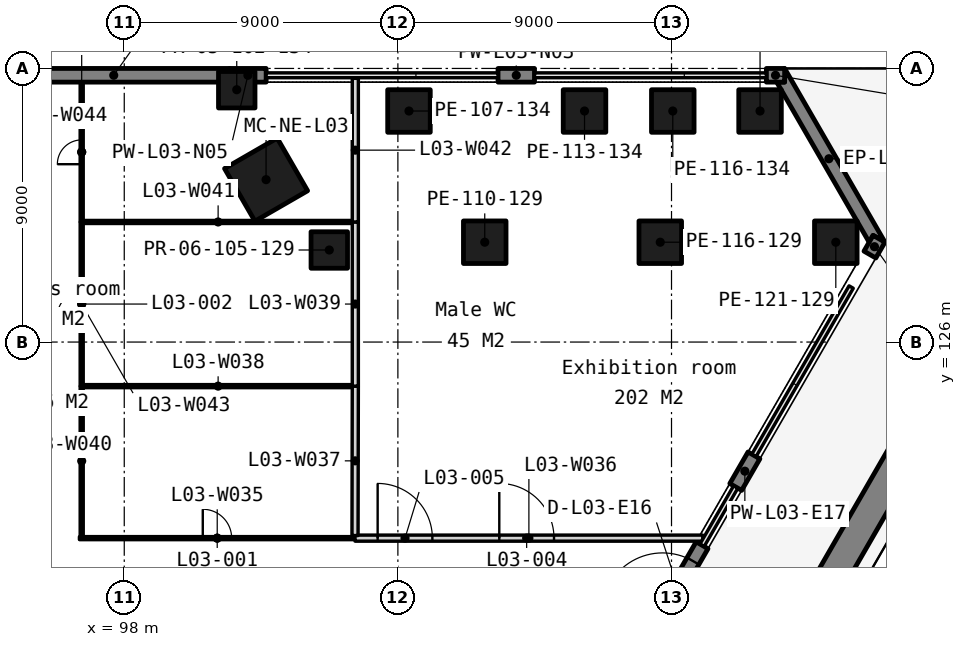
"""IFC4 building model, lengths in metres.
Left out: names, types, materials, properties, quantities, classifications, styles, units other than length and angle.
Written with IfcOpenShell. Run it as: python <this file> out.ifc"""

import sys

from ifc_helpers import new_model, si_unit, direction, frame, frame_2d, origin, origin_2d, place, context, subcontext, project, spatial, polyline, rectangle, outline, extrude, element, fill, save


model = new_model("IFC4")
c1 = context("Model", 3, precision=1e-05, world=origin(), true_north=direction((0.0, 1.0)))
c2 = subcontext(c1, "Body", "Model", "MODEL_VIEW")
j1 = project(units=[si_unit("LENGTHUNIT", "METRE"), si_unit("PLANEANGLEUNIT", "RADIAN")], contexts=[c1])
p1 = place(None, origin())
s1 = spatial("IfcSite", under=j1, at=p1, CompositionType="ELEMENT")
p2 = place(p1, origin())
s2 = spatial("IfcBuilding", under=s1, at=p2, CompositionType="ELEMENT")
p3 = place(p2, frame((0.0, 0.0, 19.5)))
s3 = spatial("IfcBuildingStorey", under=s2, at=p3, CompositionType="ELEMENT", Elevation=19.5)
for number, where, z_axis, x_axis in (
    (1, (107.365, 133.6, 0.0), (0.0, 0.0, 1.0), (1.0, 0.0, 0.0)),
    (2, (109.857, 129.284, 0.0), (0.0, 0.0, 1.0), (1.0, 0.0, 0.0)),
    (3, (113.139, 133.6, 0.0), (0.0, 0.0, 1.0), (1.0, 0.0, 0.0)),
    (4, (115.63, 129.284, 0.0), (0.0, 0.0, 1.0), (1.0, 0.0, 0.0)),
    (5, (116.042, 133.6, 0.0), (0.0, 0.0, 1.0), (1.0, 0.0, 0.0)),
    (6, (118.912, 133.6, 0.0), (0.0, 0.0, 1.0), (1.0, 0.0, 0.0)),
    (7, (121.404, 129.284, 0.0), (0.0, 0.0, 1.0), (1.0, 0.0, 0.0)),
):
    element("IfcColumn", number, at=place(p3, frame(where, z_axis=z_axis, x_axis=x_axis)), inside=s3, PredefinedType="COLUMN", context=c2, shape_type="SweptSolid", body=[
        extrude(rectangle(XDim=1.4, YDim=1.4, at=origin_2d()), origin(), (0.0, 0.0, 1.0), 5.5),
    ])
for number, where, z_axis, x_axis in (
    (8, (101.7, 134.3, 0.0), (0.0, 0.0, 1.0), (1.0, 0.0, 0.0)),
    (9, (104.744, 129.028, 0.0), (0.0, 0.0, 1.0), (1.0, 0.0, 0.0)),
):
    element("IfcColumn", number, at=place(p3, frame(where, z_axis=z_axis, x_axis=x_axis)), inside=s3, PredefinedType="COLUMN", context=c2, shape_type="SweptSolid", body=[
        extrude(rectangle(XDim=1.2, YDim=1.2, at=origin_2d()), origin(), (0.0, 0.0, 1.0), 5.5),
    ])
p4 = place(p3, frame((102.664, 131.342, 0.0), z_axis=(0.0, 0.0, 1.0), x_axis=(-0.5, 0.866025403784, 0.0)))
e10 = element("IfcColumn", 10, at=p4, inside=s3, PredefinedType="COLUMN", context=c2, shape_type="SweptSolid", body=[
    extrude(rectangle(XDim=2.0, YDim=2.0, at=origin_2d()), origin(), (0.0, 0.0, 1.0), 5.5),
])
p5 = place(p3, frame((0.0, 0.0, -0.25)))
e11 = element("IfcWall", 11, at=p5, inside=s3, PredefinedType="SOLIDWALL", context=c2, shape_type="SweptSolid", body=[
    extrude(outline(polyline([(123.021, 129.284), (122.631, 129.509), (122.501, 129.284), (119.461, 134.55), (119.72, 134.55), (119.72, 135.0), (123.021, 129.284)])), origin(), (0.0, 0.0, 1.0), 4.812),
])
p6 = place(p3, frame((119.72, 134.775, -0.25), z_axis=(0.0, 0.0, 1.0), x_axis=(-1.0, 0.0, 0.0)))
e12 = element("IfcWall", 12, at=p6, inside=s3, PredefinedType="SOLIDWALL", context=c2, shape_type="SweptSolid", body=[
    extrude(rectangle(XDim=0.6, YDim=0.45, at=frame_2d((0.3, 0.0))), origin(), (0.0, 0.0, 1.0), 4.812),
])
for number, where, z_axis, x_axis in (
    (13, (111.494, 134.775, -0.25), (0.0, 0.0, 1.0), (-1.0, 0.0, 0.0)),
    (14, (102.667, 134.775, -0.25), (0.0, 0.0, 1.0), (-1.0, 0.0, 0.0)),
):
    element("IfcWall", number, at=place(p3, frame(where, z_axis=z_axis, x_axis=x_axis)), inside=s3, PredefinedType="SOLIDWALL", context=c2, shape_type="SweptSolid", body=[
        extrude(rectangle(XDim=1.2, YDim=0.45, at=frame_2d((0.6, 0.0))), origin(), (0.0, 0.0, 1.0), 4.812),
    ])
p7 = place(p3, frame((101.467, 134.775, -0.25), z_axis=(0.0, 0.0, 1.0), x_axis=(-1.0, 0.0, 0.0)))
e15 = element("IfcWall", 15, at=p7, inside=s3, PredefinedType="SOLIDWALL", context=c2, shape_type="SweptSolid", body=[
    extrude(rectangle(XDim=7.627, YDim=0.45, at=frame_2d((3.813, 0.0))), origin(), (0.0, 0.0, 1.0), 4.812),
])
p8 = place(p3, frame((115.406, 116.545, -0.25), z_axis=(0.0, 0.0, 1.0), x_axis=(0.499995408039, 0.866028054938, 0.0)))
e16 = element("IfcWall", 16, at=p8, inside=s3, PredefinedType="SOLIDWALL", context=c2, shape_type="SweptSolid", body=[
    extrude(rectangle(XDim=3.2, YDim=0.45, at=frame_2d((1.6, 0.0))), origin(), (0.0, 0.0, 1.0), 4.812),
])
p9 = place(p8, frame((0.6, 0.0, 0.25)))
e17 = element("IfcOpeningElement", 17, at=p9, cuts=e16, PredefinedType="OPENING", context=c2, shape_type="SweptSolid", body=[
    extrude(rectangle(XDim=2.0, YDim=2.4, at=frame_2d((1.0, 1.2))), frame((0.0, 0.235, 0.0), z_axis=(0.0, -1.0, 0.0), x_axis=(1.0, 0.0, 0.0)), (0.0, 0.0, 1.0), 0.47),
])
p10 = place(p3, frame((118.112, 121.233, -0.25), z_axis=(0.0, 0.0, 1.0), x_axis=(0.499880961361, 0.866094119867, 0.0)))
e18 = element("IfcWall", 18, at=p10, inside=s3, PredefinedType="SOLIDWALL", context=c2, shape_type="SweptSolid", body=[
    extrude(rectangle(XDim=1.2, YDim=0.45, at=frame_2d((0.6, 0.0))), origin(), (0.0, 0.0, 1.0), 4.812),
])
p11 = place(p3, frame((122.526, 128.877, -0.25), z_axis=(0.0, 0.0, 1.0), x_axis=(0.50012165622, 0.865955154139, 0.0)))
e19 = element("IfcWall", 19, at=p11, inside=s3, PredefinedType="SOLIDWALL", context=c2, shape_type="SweptSolid", body=[
    extrude(rectangle(XDim=0.6, YDim=0.45, at=frame_2d((0.3, 0.0))), origin(), (0.0, 0.0, 1.0), 4.812),
])
p12 = place(p3, frame((127.528, 129.091, 0.0), z_axis=(0.0, 0.0, 1.0), x_axis=(-0.500001590908, -0.866024485271, 0.0)))
e20 = element("IfcWall", 20, at=p12, inside=s3, PredefinedType="STANDARD", context=c2, shape_type="SweptSolid", body=[
    extrude(rectangle(XDim=89.388, YDim=1.0, at=frame_2d((44.694, 0.0))), origin(), (0.0, 0.0, 1.0), 0.6),
])
p13 = place(p3, frame((96.525, 119.55, 0.0), z_axis=(0.0, 0.0, 1.0), x_axis=(1.0, 0.0, 0.0)))
e21 = element("IfcWall", 21, at=p13, inside=s3, PredefinedType="PARTITIONING", context=c2, shape_type="SweptSolid", body=[
    extrude(rectangle(XDim=9.065, YDim=0.1, at=frame_2d((4.532, 0.0))), origin(), (0.0, 0.0, 1.0), 5.25),
])
p14 = place(p13, frame((4.057, 0.0, 0.0)))
e22 = element("IfcOpeningElement", 22, at=p14, cuts=e21, PredefinedType="OPENING", context=c2, shape_type="SweptSolid", body=[
    extrude(rectangle(XDim=0.95, YDim=2.1, at=frame_2d((0.475, 1.05))), frame((0.0, 0.06, 0.0), z_axis=(0.0, -1.0, 0.0), x_axis=(1.0, 0.0, 0.0)), (0.0, 0.0, 1.0), 0.12),
])
p15 = place(p3, frame((105.59, 119.55, 0.0), z_axis=(0.0, 0.0, 1.0), x_axis=(1.0, 0.0, 0.0)))
e23 = element("IfcWall", 23, at=p15, inside=s3, PredefinedType="PARTITIONING", context=c2, shape_type="SweptSolid", body=[
    extrude(rectangle(XDim=11.438, YDim=0.2, at=frame_2d((5.719, 0.0))), origin(), (0.0, 0.0, 1.0), 5.25),
])
p16 = place(p15, frame((4.745, 0.0, 0.0)))
e24 = element("IfcOpeningElement", 24, at=p16, cuts=e23, PredefinedType="OPENING", context=c2, shape_type="SweptSolid", body=[
    extrude(rectangle(XDim=1.8, YDim=2.1, at=frame_2d((0.9, 1.05))), frame((0.0, 0.11, 0.0), z_axis=(0.0, -1.0, 0.0), x_axis=(1.0, 0.0, 0.0)), (0.0, 0.0, 1.0), 0.22),
])
p17 = place(p15, frame((0.745, 0.0, 0.0)))
e25 = element("IfcOpeningElement", 25, at=p17, cuts=e23, PredefinedType="OPENING", context=c2, shape_type="SweptSolid", body=[
    extrude(rectangle(XDim=1.8, YDim=2.1, at=frame_2d((0.9, 1.05))), frame((0.0, 0.11, 0.0), z_axis=(0.0, -1.0, 0.0), x_axis=(1.0, 0.0, 0.0)), (0.0, 0.0, 1.0), 0.22),
])
p18 = place(p3, frame((105.59, 119.635, 0.0), z_axis=(0.0, 0.0, 1.0), x_axis=(0.002036554489, 0.999997926221, 0.0)))
e26 = element("IfcWall", 26, at=p18, inside=s3, PredefinedType="PARTITIONING", context=c2, shape_type="SweptSolid", body=[
    extrude(rectangle(XDim=4.915, YDim=0.2, at=frame_2d((2.458, 0.0))), origin(), (0.0, 0.0, 1.0), 5.25),
])
p19 = place(p3, frame((96.675, 124.55, 0.0), z_axis=(0.0, 0.0, 1.0), x_axis=(1.0, 0.0, 0.0)))
e27 = element("IfcWall", 27, at=p19, inside=s3, PredefinedType="PARTITIONING", context=c2, shape_type="SweptSolid", body=[
    extrude(rectangle(XDim=8.825, YDim=0.1, at=frame_2d((4.413, 0.0))), origin(), (0.0, 0.0, 1.0), 5.25),
])
p20 = place(p3, frame((105.6, 124.55, 0.0), z_axis=(0.0, 0.0, 1.0), x_axis=(0.0, 1.0, 0.0)))
e28 = element("IfcWall", 28, at=p20, inside=s3, PredefinedType="PARTITIONING", context=c2, shape_type="SweptSolid", body=[
    extrude(rectangle(XDim=5.4, YDim=0.2, at=frame_2d((2.7, 0.0))), origin(), (0.0, 0.0, 1.0), 5.25),
])
p21 = place(p3, frame((96.601, 119.625, 0.0), z_axis=(0.0, 0.0, 1.0), x_axis=(-9.9142418e-05, 0.999999995085, 0.0)))
e29 = element("IfcWall", 29, at=p21, inside=s3, PredefinedType="PARTITIONING", context=c2, shape_type="SweptSolid", body=[
    extrude(rectangle(XDim=4.925, YDim=0.1, at=frame_2d((2.462, 0.0))), origin(), (0.0, 0.0, 1.0), 5.25),
])
p22 = place(p3, frame((96.675, 129.95, 0.0), z_axis=(0.0, 0.0, 1.0), x_axis=(1.0, 0.0, 0.0)))
e30 = element("IfcWall", 30, at=p22, inside=s3, PredefinedType="PARTITIONING", context=c2, shape_type="SweptSolid", body=[
    extrude(rectangle(XDim=8.825, YDim=0.1, at=frame_2d((4.413, 0.0))), origin(), (0.0, 0.0, 1.0), 5.25),
])
p23 = place(p3, frame((105.6, 129.95, 0.0), z_axis=(0.0, 0.0, 1.0), x_axis=(0.0, 1.0, 0.0)))
e31 = element("IfcWall", 31, at=p23, inside=s3, PredefinedType="PARTITIONING", context=c2, shape_type="SweptSolid", body=[
    extrude(rectangle(XDim=4.725, YDim=0.2, at=frame_2d((2.363, 0.0))), origin(), (0.0, 0.0, 1.0), 5.25),
])
p24 = place(p3, frame((96.6, 124.55, 0.0), z_axis=(0.0, 0.0, 1.0), x_axis=(0.0, 1.0, 0.0)))
e32 = element("IfcWall", 32, at=p24, inside=s3, PredefinedType="PARTITIONING", context=c2, shape_type="SweptSolid", body=[
    extrude(rectangle(XDim=5.4, YDim=0.1, at=frame_2d((2.7, 0.0))), origin(), (0.0, 0.0, 1.0), 5.25),
])
p25 = place(p24, frame((2.3, 0.0, 0.0)))
e33 = element("IfcOpeningElement", 33, at=p25, cuts=e32, PredefinedType="OPENING", context=c2, shape_type="SweptSolid", body=[
    extrude(rectangle(XDim=0.8, YDim=2.1, at=frame_2d((0.4, 1.05))), frame((0.0, 0.06, 0.0), z_axis=(0.0, -1.0, 0.0), x_axis=(1.0, 0.0, 0.0)), (0.0, 0.0, 1.0), 0.12),
])
p26 = place(p3, frame((96.6, 129.95, 0.0), z_axis=(0.0, 0.0, 1.0), x_axis=(0.0, 1.0, 0.0)))
e34 = element("IfcWall", 34, at=p26, inside=s3, PredefinedType="PARTITIONING", context=c2, shape_type="SweptSolid", body=[
    extrude(rectangle(XDim=4.6, YDim=0.1, at=frame_2d((2.3, 0.0))), origin(), (0.0, 0.0, 1.0), 5.25),
])
p27 = place(p26, frame((1.9, 0.0, 0.0)))
e35 = element("IfcOpeningElement", 35, at=p27, cuts=e34, PredefinedType="OPENING", context=c2, shape_type="SweptSolid", body=[
    extrude(rectangle(XDim=0.8, YDim=2.1, at=frame_2d((0.4, 1.05))), frame((0.0, 0.06, 0.0), z_axis=(0.0, -1.0, 0.0), x_axis=(1.0, 0.0, 0.0)), (0.0, 0.0, 1.0), 0.12),
])
p28 = place(p9, origin())
e36 = element("IfcDoor", 36, at=p28, inside=s3, OperationType="DOUBLE_DOOR_SINGLE_SWING", PredefinedType="DOOR", context=c2, shape_type="SweptSolid", body=[
    extrude(rectangle(XDim=2.0, YDim=2.4, at=frame_2d((1.0, 1.2))), frame((0.0, 0.025, 0.0), z_axis=(0.0, -1.0, 0.0), x_axis=(1.0, 0.0, 0.0)), (0.0, 0.0, 1.0), 0.05),
])
fill(e17, e36)
p29 = place(p14, origin())
e37 = element("IfcDoor", 37, at=p29, inside=s3, OperationType="SINGLE_SWING_LEFT", PredefinedType="DOOR", context=c2, shape_type="SweptSolid", body=[
    extrude(rectangle(XDim=0.95, YDim=2.1, at=frame_2d((0.475, 1.05))), frame((0.0, 0.025, 0.0), z_axis=(0.0, -1.0, 0.0), x_axis=(1.0, 0.0, 0.0)), (0.0, 0.0, 1.0), 0.05),
])
fill(e22, e37)
p30 = place(p25, origin())
e38 = element("IfcDoor", 38, at=p30, inside=s3, OperationType="SINGLE_SWING_LEFT", PredefinedType="DOOR", context=c2, shape_type="SweptSolid", body=[
    extrude(rectangle(XDim=0.8, YDim=2.1, at=frame_2d((0.4, 1.05))), frame((0.0, 0.025, 0.0), z_axis=(0.0, -1.0, 0.0), x_axis=(1.0, 0.0, 0.0)), (0.0, 0.0, 1.0), 0.05),
])
fill(e33, e38)
p31 = place(p27, origin())
e39 = element("IfcDoor", 39, at=p31, inside=s3, OperationType="SINGLE_SWING_LEFT", PredefinedType="DOOR", context=c2, shape_type="SweptSolid", body=[
    extrude(rectangle(XDim=0.8, YDim=2.1, at=frame_2d((0.4, 1.05))), frame((0.0, 0.025, 0.0), z_axis=(0.0, -1.0, 0.0), x_axis=(1.0, 0.0, 0.0)), (0.0, 0.0, 1.0), 0.05),
])
fill(e35, e39)
p32 = place(p16, origin())
e40 = element("IfcDoor", 40, at=p32, inside=s3, OperationType="SINGLE_SWING_LEFT", PredefinedType="DOOR", context=c2, shape_type="SweptSolid", body=[
    extrude(rectangle(XDim=1.8, YDim=2.1, at=frame_2d((0.9, 1.05))), frame((0.0, 0.025, 0.0), z_axis=(0.0, -1.0, 0.0), x_axis=(1.0, 0.0, 0.0)), (0.0, 0.0, 1.0), 0.05),
])
fill(e24, e40)
p33 = place(p17, origin())
e41 = element("IfcDoor", 41, at=p33, inside=s3, OperationType="SINGLE_SWING_LEFT", PredefinedType="DOOR", context=c2, shape_type="SweptSolid", body=[
    extrude(rectangle(XDim=1.8, YDim=2.1, at=frame_2d((0.9, 1.05))), frame((0.0, 0.025, 0.0), z_axis=(0.0, -1.0, 0.0), x_axis=(1.0, 0.0, 0.0)), (0.0, 0.0, 1.0), 0.05),
])
fill(e25, e41)
save(model, sys.argv[1])
